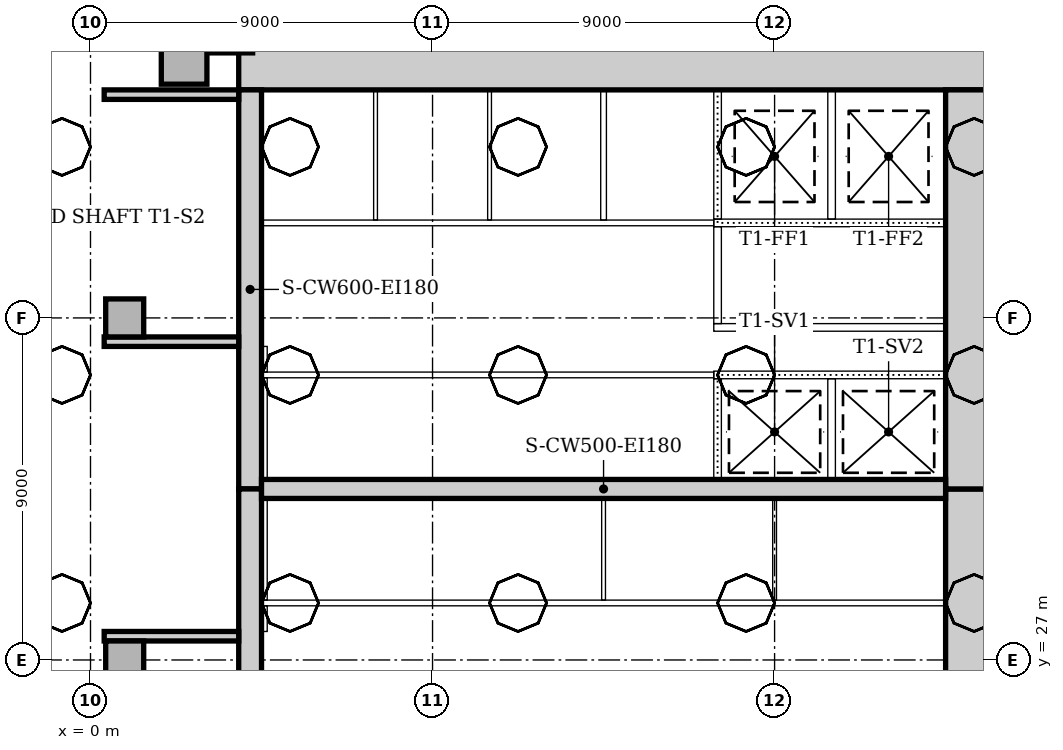
"""IFC4 building model, lengths in metres.
Left out: names, types, materials, properties, quantities, classifications, styles, units other than length and angle.
Written with IfcOpenShell. Run it as: python <this file> out.ifc"""

import sys

from ifc_helpers import new_model, si_unit, direction, frame, frame_2d, origin, origin_2d, place, context, subcontext, project, spatial, rectangle, extrude, element, fill, save


model = new_model("IFC4")
c1 = context("Model", 3, precision=1e-05, world=origin(), true_north=direction((0.0, 1.0)))
c2 = subcontext(c1, "Body", "Model", "MODEL_VIEW")
j1 = project(units=[si_unit("LENGTHUNIT", "METRE"), si_unit("PLANEANGLEUNIT", "RADIAN")], contexts=[c1])
p1 = place(None, origin())
s1 = spatial("IfcSite", under=j1, at=p1, CompositionType="ELEMENT")
p2 = place(p1, origin())
s2 = spatial("IfcBuilding", under=s1, at=p2, CompositionType="ELEMENT")
p3 = place(p2, frame((0.0, 0.0, -14.0)))
s3 = spatial("IfcBuildingStorey", under=s2, at=p3, CompositionType="ELEMENT", Elevation=-14.0)
p4 = place(p3, frame((23.7, 42.6, 0.0), z_axis=(0.0, 0.0, 1.0), x_axis=(-1.0, 0.0, 0.0)))
e1 = element("IfcWall", 1, at=p4, inside=s3, PredefinedType="SOLIDWALL", context=c2, shape_type="SweptSolid", body=[
    extrude(rectangle(XDim=19.8, YDim=1.2, at=frame_2d((9.9, 0.0))), origin(), (0.0, 0.0, 1.0), 4.5),
])
p5 = place(p3, frame((23.1, 21.0, 0.0), z_axis=(0.0, 0.0, 1.0), x_axis=(0.0, 1.0, 0.0)))
e2 = element("IfcWall", 2, at=p5, inside=s3, PredefinedType="SOLIDWALL", context=c2, shape_type="SweptSolid", body=[
    extrude(rectangle(XDim=10.5, YDim=1.2, at=frame_2d((5.25, 0.0))), origin(), (0.0, 0.0, 1.0), 4.5),
])
p6 = place(p5, frame((4.35, 0.0, 0.0)))
e3 = element("IfcOpeningElement", 3, at=p6, cuts=e2, PredefinedType="OPENING", context=c2, shape_type="SweptSolid", body=[
    extrude(rectangle(XDim=1.8, YDim=2.1, at=frame_2d((0.9, 1.05))), frame((0.0, 0.61, 0.0), z_axis=(0.0, -1.0, 0.0), x_axis=(1.0, 0.0, 0.0)), (0.0, 0.0, 1.0), 1.22),
])
p7 = place(p3, frame((23.1, 31.5, 0.0), z_axis=(0.0, 0.0, 1.0), x_axis=(0.0, 1.0, 0.0)))
e4 = element("IfcWall", 4, at=p7, inside=s3, PredefinedType="SOLIDWALL", context=c2, shape_type="SweptSolid", body=[
    extrude(rectangle(XDim=10.5, YDim=1.2, at=frame_2d((5.25, 0.0))), origin(), (0.0, 0.0, 1.0), 4.5),
])
p8 = place(p7, frame((3.15, 0.0, 0.0)))
e5 = element("IfcOpeningElement", 5, at=p8, cuts=e4, PredefinedType="OPENING", context=c2, shape_type="SweptSolid", body=[
    extrude(rectangle(XDim=1.0, YDim=2.1, at=frame_2d((0.5, 1.05))), frame((0.0, 0.61, 0.0), z_axis=(0.0, -1.0, 0.0), x_axis=(1.0, 0.0, 0.0)), (0.0, 0.0, 1.0), 1.22),
])
p9 = place(p7, frame((5.2, 0.0, 0.0)))
e6 = element("IfcOpeningElement", 6, at=p9, cuts=e4, PredefinedType="OPENING", context=c2, shape_type="SweptSolid", body=[
    extrude(rectangle(XDim=1.0, YDim=2.1, at=frame_2d((0.5, 1.05))), frame((0.0, 0.61, 0.0), z_axis=(0.0, -1.0, 0.0), x_axis=(1.0, 0.0, 0.0)), (0.0, 0.0, 1.0), 1.22),
])
for number, where, z_axis, x_axis in (
    (7, (4.2, 42.0, 0.0), (0.0, 0.0, 1.0), (0.0, -1.0, 0.0)),
    (8, (4.2, 31.5, 0.0), (0.0, 0.0, 1.0), (0.0, -1.0, 0.0)),
):
    element("IfcWall", number, at=place(p3, frame(where, z_axis=z_axis, x_axis=x_axis)), inside=s3, PredefinedType="SOLIDWALL", context=c2, shape_type="SweptSolid", body=[
        extrude(rectangle(XDim=10.5, YDim=0.6, at=frame_2d((5.25, 0.0))), origin(), (0.0, 0.0, 1.0), 4.5),
    ])
p10 = place(p3, frame((4.5, 31.5, 0.0), z_axis=(0.0, 0.0, 1.0), x_axis=(1.0, 0.0, 0.0)))
e9 = element("IfcWall", 9, at=p10, inside=s3, PredefinedType="SOLIDWALL", context=c2, shape_type="SweptSolid", body=[
    extrude(rectangle(XDim=18.0, YDim=0.5, at=frame_2d((9.0, 0.0))), origin(), (0.0, 0.0, 1.0), 4.5),
])
for number, where, z_axis, x_axis in (
    (10, (3.9, 27.625, 0.0), (0.0, 0.0, 1.0), (-1.0, 0.0, 0.0)),
    (11, (0.36, 35.375, 0.0), (0.0, 0.0, 1.0), (1.0, 0.0, 0.0)),
    (12, (3.9, 41.875, 0.0), (0.0, 0.0, 1.0), (-1.0, 0.0, 0.0)),
):
    element("IfcWall", number, at=place(p3, frame(where, z_axis=z_axis, x_axis=x_axis)), inside=s3, PredefinedType="SOLIDWALL", context=c2, shape_type="SweptSolid", body=[
        extrude(rectangle(XDim=3.54, YDim=0.25, at=frame_2d((1.77, 0.0))), origin(), (0.0, 0.0, 1.0), 4.5),
    ])
for number, where, z_axis, x_axis in (
    (13, (3.667, 43.574, 0.0), (0.0, 0.0, 1.0), (1.0, 0.0, 0.0)),
    (14, (2.463, 42.75, 0.0), (0.0, 0.0, 1.0), (1.0, 0.0, 0.0)),
):
    element("IfcColumn", number, at=place(p3, frame(where, z_axis=z_axis, x_axis=x_axis)), inside=s3, PredefinedType="COLUMN", context=c2, shape_type="SweptSolid", body=[
        extrude(rectangle(XDim=1.2, YDim=1.2, at=origin_2d()), origin(), (0.0, 0.0, 1.0), 4.15),
    ])
for number, where, z_axis, x_axis in (
    (15, (0.9, 27.0, 0.0), (0.0, 0.0, 1.0), (1.0, 0.0, 0.0)),
    (16, (0.9, 36.0, 0.0), (0.0, 0.0, 1.0), (1.0, 0.0, 0.0)),
):
    element("IfcColumn", number, at=place(p3, frame(where, z_axis=z_axis, x_axis=x_axis)), inside=s3, PredefinedType="COLUMN", context=c2, shape_type="SweptSolid", body=[
        extrude(rectangle(XDim=1.0, YDim=1.0, at=origin_2d()), origin(), (0.0, 0.0, 1.0), 4.5),
    ])
p11 = place(p3, frame((16.4, 35.75, 0.0), z_axis=(0.0, 0.0, 1.0), x_axis=(1.0, 0.0, 0.0)))
e17 = element("IfcWall", 17, at=p11, inside=s3, PredefinedType="PARTITIONING", context=c2, shape_type="SweptSolid", body=[
    extrude(rectangle(XDim=6.1, YDim=0.2, at=frame_2d((3.05, 0.0))), origin(), (0.0, 0.0, 1.0), 4.15),
])
p12 = place(p3, frame((16.4, 38.5, 0.0), z_axis=(0.0, 0.0, 1.0), x_axis=(1.0, 0.0, 0.0)))
e18 = element("IfcWall", 18, at=p12, inside=s3, PredefinedType="PARTITIONING", context=c2, shape_type="SweptSolid", body=[
    extrude(rectangle(XDim=6.1, YDim=0.2, at=frame_2d((3.05, 0.0))), origin(), (0.0, 0.0, 1.0), 4.15),
])
p13 = place(p12, frame((1.0, 0.0, 0.0)))
e19 = element("IfcOpeningElement", 19, at=p13, cuts=e18, PredefinedType="OPENING", context=c2, shape_type="SweptSolid", body=[
    extrude(rectangle(XDim=1.2, YDim=2.1, at=frame_2d((0.6, 1.05))), frame((0.0, 0.11, 0.0), z_axis=(0.0, -1.0, 0.0), x_axis=(1.0, 0.0, 0.0)), (0.0, 0.0, 1.0), 0.22),
])
p14 = place(p12, frame((4.0, 0.0, 0.0)))
e20 = element("IfcOpeningElement", 20, at=p14, cuts=e18, PredefinedType="OPENING", context=c2, shape_type="SweptSolid", body=[
    extrude(rectangle(XDim=1.2, YDim=2.1, at=frame_2d((0.6, 1.05))), frame((0.0, 0.11, 0.0), z_axis=(0.0, -1.0, 0.0), x_axis=(1.0, 0.0, 0.0)), (0.0, 0.0, 1.0), 0.22),
])
p15 = place(p3, frame((16.5, 35.85, 0.0), z_axis=(0.0, 0.0, 1.0), x_axis=(0.0, 1.0, 0.0)))
e21 = element("IfcWall", 21, at=p15, inside=s3, PredefinedType="PARTITIONING", context=c2, shape_type="SweptSolid", body=[
    extrude(rectangle(XDim=2.55, YDim=0.2, at=frame_2d((1.275, 0.0))), origin(), (0.0, 0.0, 1.0), 4.15),
])
p16 = place(p3, frame((16.4, 34.5, 0.0), z_axis=(0.0, 0.0, 1.0), x_axis=(1.0, 0.0, 0.0)))
e22 = element("IfcWall", 22, at=p16, inside=s3, PredefinedType="PARTITIONING", context=c2, shape_type="SweptSolid", body=[
    extrude(rectangle(XDim=6.1, YDim=0.2, at=frame_2d((3.05, 0.0))), origin(), (0.0, 0.0, 1.0), 4.15),
])
p17 = place(p16, frame((1.05, 0.0, 0.0)))
e23 = element("IfcOpeningElement", 23, at=p17, cuts=e22, PredefinedType="OPENING", context=c2, shape_type="SweptSolid", body=[
    extrude(rectangle(XDim=1.1, YDim=2.1, at=frame_2d((0.55, 1.05))), frame((0.0, 0.11, 0.0), z_axis=(0.0, -1.0, 0.0), x_axis=(1.0, 0.0, 0.0)), (0.0, 0.0, 1.0), 0.22),
])
p18 = place(p16, frame((4.05, 0.0, 0.0)))
e24 = element("IfcOpeningElement", 24, at=p18, cuts=e22, PredefinedType="OPENING", context=c2, shape_type="SweptSolid", body=[
    extrude(rectangle(XDim=1.1, YDim=2.1, at=frame_2d((0.55, 1.05))), frame((0.0, 0.11, 0.0), z_axis=(0.0, -1.0, 0.0), x_axis=(1.0, 0.0, 0.0)), (0.0, 0.0, 1.0), 0.22),
])
for number, where, z_axis, x_axis in (
    (25, (16.5, 38.6, 0.0), (0.0, 0.0, 1.0), (0.0, 1.0, 0.0)),
    (26, (19.5, 38.6, 0.0), (0.0, 0.0, 1.0), (0.0, 1.0, 0.0)),
):
    element("IfcWall", number, at=place(p3, frame(where, z_axis=z_axis, x_axis=x_axis)), inside=s3, PredefinedType="PARTITIONING", context=c2, shape_type="SweptSolid", body=[
        extrude(rectangle(XDim=3.4, YDim=0.2, at=frame_2d((1.7, 0.0))), origin(), (0.0, 0.0, 1.0), 4.15),
    ])
for number, where, z_axis, x_axis in (
    (27, (16.5, 31.75, 0.0), (0.0, 0.0, 1.0), (0.0, 1.0, 0.0)),
    (28, (19.5, 31.75, 0.0), (0.0, 0.0, 1.0), (0.0, 1.0, 0.0)),
):
    element("IfcWall", number, at=place(p3, frame(where, z_axis=z_axis, x_axis=x_axis)), inside=s3, PredefinedType="PARTITIONING", context=c2, shape_type="SweptSolid", body=[
        extrude(rectangle(XDim=2.65, YDim=0.2, at=frame_2d((1.325, 0.0))), origin(), (0.0, 0.0, 1.0), 4.15),
    ])
p19 = place(p3, frame((4.5, 28.5, 0.0), z_axis=(0.0, 0.0, 1.0), x_axis=(1.0, 0.0, 0.0)))
e29 = element("IfcWall", 29, at=p19, inside=s3, PredefinedType="PARTITIONING", context=c2, shape_type="SweptSolid", body=[
    extrude(rectangle(XDim=18.0, YDim=0.15, at=frame_2d((9.0, 0.0))), origin(), (0.0, 0.0, 1.0), 4.15),
])
p20 = place(p19, frame((4.1, 0.0, 0.0)))
e30 = element("IfcOpeningElement", 30, at=p20, cuts=e29, PredefinedType="OPENING", context=c2, shape_type="SweptSolid", body=[
    extrude(rectangle(XDim=0.9, YDim=2.1, at=frame_2d((0.45, 1.05))), frame((0.0, 0.085, 0.0), z_axis=(0.0, -1.0, 0.0), x_axis=(1.0, 0.0, 0.0)), (0.0, 0.0, 1.0), 0.17),
])
p21 = place(p19, frame((10.8, 0.0, 0.0)))
e31 = element("IfcOpeningElement", 31, at=p21, cuts=e29, PredefinedType="OPENING", context=c2, shape_type="SweptSolid", body=[
    extrude(rectangle(XDim=0.9, YDim=2.1, at=frame_2d((0.45, 1.05))), frame((0.0, 0.085, 0.0), z_axis=(0.0, -1.0, 0.0), x_axis=(1.0, 0.0, 0.0)), (0.0, 0.0, 1.0), 0.17),
])
p22 = place(p19, frame((15.2, 0.0, 0.0)))
e32 = element("IfcOpeningElement", 32, at=p22, cuts=e29, PredefinedType="OPENING", context=c2, shape_type="SweptSolid", body=[
    extrude(rectangle(XDim=0.9, YDim=2.1, at=frame_2d((0.45, 1.05))), frame((0.0, 0.085, 0.0), z_axis=(0.0, -1.0, 0.0), x_axis=(1.0, 0.0, 0.0)), (0.0, 0.0, 1.0), 0.17),
])
p23 = place(p3, frame((4.5, 34.5, 0.0), z_axis=(0.0, 0.0, 1.0), x_axis=(1.0, 0.0, 0.0)))
e33 = element("IfcWall", 33, at=p23, inside=s3, PredefinedType="PARTITIONING", context=c2, shape_type="SweptSolid", body=[
    extrude(rectangle(XDim=11.9, YDim=0.15, at=frame_2d((5.95, 0.0))), origin(), (0.0, 0.0, 1.0), 4.15),
])
p24 = place(p23, frame((5.5, 0.0, 0.0)))
e34 = element("IfcOpeningElement", 34, at=p24, cuts=e33, PredefinedType="OPENING", context=c2, shape_type="SweptSolid", body=[
    extrude(rectangle(XDim=0.9, YDim=2.1, at=frame_2d((0.45, 1.05))), frame((0.0, 0.085, 0.0), z_axis=(0.0, -1.0, 0.0), x_axis=(1.0, 0.0, 0.0)), (0.0, 0.0, 1.0), 0.17),
])
p25 = place(p3, frame((4.5, 38.5, 0.0), z_axis=(0.0, 0.0, 1.0), x_axis=(1.0, 0.0, 0.0)))
e35 = element("IfcWall", 35, at=p25, inside=s3, PredefinedType="PARTITIONING", context=c2, shape_type="SweptSolid", body=[
    extrude(rectangle(XDim=11.9, YDim=0.15, at=frame_2d((5.95, 0.0))), origin(), (0.0, 0.0, 1.0), 4.15),
])
p26 = place(p25, frame((1.1, 0.0, 0.0)))
e36 = element("IfcOpeningElement", 36, at=p26, cuts=e35, PredefinedType="OPENING", context=c2, shape_type="SweptSolid", body=[
    extrude(rectangle(XDim=0.9, YDim=2.1, at=frame_2d((0.45, 1.05))), frame((0.0, 0.085, 0.0), z_axis=(0.0, -1.0, 0.0), x_axis=(1.0, 0.0, 0.0)), (0.0, 0.0, 1.0), 0.17),
])
p27 = place(p25, frame((4.05, 0.0, 0.0)))
e37 = element("IfcOpeningElement", 37, at=p27, cuts=e35, PredefinedType="OPENING", context=c2, shape_type="SweptSolid", body=[
    extrude(rectangle(XDim=0.9, YDim=2.1, at=frame_2d((0.45, 1.05))), frame((0.0, 0.085, 0.0), z_axis=(0.0, -1.0, 0.0), x_axis=(1.0, 0.0, 0.0)), (0.0, 0.0, 1.0), 0.17),
])
p28 = place(p25, frame((7.05, 0.0, 0.0)))
e38 = element("IfcOpeningElement", 38, at=p28, cuts=e35, PredefinedType="OPENING", context=c2, shape_type="SweptSolid", body=[
    extrude(rectangle(XDim=0.9, YDim=2.1, at=frame_2d((0.45, 1.05))), frame((0.0, 0.085, 0.0), z_axis=(0.0, -1.0, 0.0), x_axis=(1.0, 0.0, 0.0)), (0.0, 0.0, 1.0), 0.17),
])
p29 = place(p25, frame((9.95, 0.0, 0.0)))
e39 = element("IfcOpeningElement", 39, at=p29, cuts=e35, PredefinedType="OPENING", context=c2, shape_type="SweptSolid", body=[
    extrude(rectangle(XDim=0.8, YDim=2.1, at=frame_2d((0.4, 1.05))), frame((0.0, 0.085, 0.0), z_axis=(0.0, -1.0, 0.0), x_axis=(1.0, 0.0, 0.0)), (0.0, 0.0, 1.0), 0.17),
])
p30 = place(p3, frame((4.575, 34.575, 0.0), z_axis=(0.0, 0.0, 1.0), x_axis=(0.0, 1.0, 0.0)))
e40 = element("IfcWall", 40, at=p30, inside=s3, PredefinedType="PARTITIONING", context=c2, shape_type="SweptSolid", body=[
    extrude(rectangle(XDim=0.675, YDim=0.15, at=frame_2d((0.338, 0.0))), origin(), (0.0, 0.0, 1.0), 4.15),
])
p31 = place(p3, frame((4.575, 31.75, 0.0), z_axis=(0.0, 0.0, 1.0), x_axis=(0.0, 1.0, 0.0)))
e41 = element("IfcWall", 41, at=p31, inside=s3, PredefinedType="PARTITIONING", context=c2, shape_type="SweptSolid", body=[
    extrude(rectangle(XDim=2.675, YDim=0.15, at=frame_2d((1.337, 0.0))), origin(), (0.0, 0.0, 1.0), 4.15),
])
p32 = place(p3, frame((4.575, 27.75, 0.0), z_axis=(0.0, 0.0, 1.0), x_axis=(0.0, 1.0, 0.0)))
e42 = element("IfcWall", 42, at=p32, inside=s3, PredefinedType="PARTITIONING", context=c2, shape_type="SweptSolid", body=[
    extrude(rectangle(XDim=0.675, YDim=0.15, at=frame_2d((0.338, 0.0))), origin(), (0.0, 0.0, 1.0), 4.15),
])
p33 = place(p3, frame((4.575, 28.575, 0.0), z_axis=(0.0, 0.0, 1.0), x_axis=(0.0, 1.0, 0.0)))
e43 = element("IfcWall", 43, at=p33, inside=s3, PredefinedType="PARTITIONING", context=c2, shape_type="SweptSolid", body=[
    extrude(rectangle(XDim=2.675, YDim=0.15, at=frame_2d((1.337, 0.0))), origin(), (0.0, 0.0, 1.0), 4.15),
])
p34 = place(p3, frame((13.5, 38.575, 0.0), z_axis=(0.0, 0.0, 1.0), x_axis=(0.0, 1.0, 0.0)))
e44 = element("IfcWall", 44, at=p34, inside=s3, PredefinedType="PARTITIONING", context=c2, shape_type="SweptSolid", body=[
    extrude(rectangle(XDim=3.425, YDim=0.15, at=frame_2d((1.712, 0.0))), origin(), (0.0, 0.0, 1.0), 4.15),
])
for number, where, z_axis, x_axis in (
    (45, (7.5, 38.575, 0.0), (0.0, 0.0, 1.0), (0.0, 1.0, 0.0)),
    (46, (10.5, 38.575, 0.0), (0.0, 0.0, 1.0), (0.0, 1.0, 0.0)),
):
    element("IfcWall", number, at=place(p3, frame(where, z_axis=z_axis, x_axis=x_axis)), inside=s3, PredefinedType="PARTITIONING", context=c2, shape_type="SweptSolid", body=[
        extrude(rectangle(XDim=3.425, YDim=0.1, at=frame_2d((1.712, 0.0))), origin(), (0.0, 0.0, 1.0), 4.15),
    ])
for number, where, z_axis, x_axis in (
    (47, (13.5, 28.575, 0.0), (0.0, 0.0, 1.0), (0.0, 1.0, 0.0)),
    (48, (18.0, 28.575, 0.0), (0.0, 0.0, 1.0), (0.0, 1.0, 0.0)),
):
    element("IfcWall", number, at=place(p3, frame(where, z_axis=z_axis, x_axis=x_axis)), inside=s3, PredefinedType="PARTITIONING", context=c2, shape_type="SweptSolid", body=[
        extrude(rectangle(XDim=2.675, YDim=0.1, at=frame_2d((1.337, 0.0))), origin(), (0.0, 0.0, 1.0), 4.15),
    ])
p35 = place(p2, frame((0.0, 0.0, -9.5)))
s4 = spatial("IfcBuildingStorey", under=s2, at=p35, CompositionType="ELEMENT", Elevation=-9.5)
p36 = place(p35, frame((0.48, 40.17, -4.5), z_axis=(0.0, 0.0, 1.0), x_axis=(0.0, 1.0, 0.0)))
e49 = element("IfcWall", 49, at=p36, inside=s4, PredefinedType="STANDARD", context=c2, shape_type="SweptSolid", body=[
    extrude(rectangle(XDim=1.58, YDim=0.24, at=frame_2d((0.79, 0.0))), origin(), (0.0, 0.0, 1.0), 9.0),
])
p37 = place(p17, origin())
e50 = element("IfcDoor", 50, at=p37, inside=s3, OperationType="SLIDING_TO_LEFT", PredefinedType="DOOR", context=c2, shape_type="SweptSolid", body=[
    extrude(rectangle(XDim=1.1, YDim=2.1, at=frame_2d((0.55, 1.05))), frame((0.0, 0.025, 0.0), z_axis=(0.0, -1.0, 0.0), x_axis=(1.0, 0.0, 0.0)), (0.0, 0.0, 1.0), 0.05),
])
fill(e23, e50)
p38 = place(p18, origin())
e51 = element("IfcDoor", 51, at=p38, inside=s3, OperationType="SLIDING_TO_LEFT", PredefinedType="DOOR", context=c2, shape_type="SweptSolid", body=[
    extrude(rectangle(XDim=1.1, YDim=2.1, at=frame_2d((0.55, 1.05))), frame((0.0, 0.025, 0.0), z_axis=(0.0, -1.0, 0.0), x_axis=(1.0, 0.0, 0.0)), (0.0, 0.0, 1.0), 0.05),
])
fill(e24, e51)
p39 = place(p13, origin())
e52 = element("IfcDoor", 52, at=p39, inside=s3, OperationType="SLIDING_TO_LEFT", PredefinedType="DOOR", context=c2, shape_type="SweptSolid", body=[
    extrude(rectangle(XDim=1.2, YDim=2.1, at=frame_2d((0.6, 1.05))), frame((0.0, 0.025, 0.0), z_axis=(0.0, -1.0, 0.0), x_axis=(1.0, 0.0, 0.0)), (0.0, 0.0, 1.0), 0.05),
])
fill(e19, e52)
p40 = place(p14, origin())
e53 = element("IfcDoor", 53, at=p40, inside=s3, OperationType="SLIDING_TO_LEFT", PredefinedType="DOOR", context=c2, shape_type="SweptSolid", body=[
    extrude(rectangle(XDim=1.2, YDim=2.1, at=frame_2d((0.6, 1.05))), frame((0.0, 0.025, 0.0), z_axis=(0.0, -1.0, 0.0), x_axis=(1.0, 0.0, 0.0)), (0.0, 0.0, 1.0), 0.05),
])
fill(e20, e53)
p41 = place(p6, frame((1.8, 0.0, 0.0), z_axis=(0.0, 0.0, 1.0), x_axis=(-1.0, 0.0, 0.0)))
e54 = element("IfcDoor", 54, at=p41, inside=s3, OperationType="DOUBLE_DOOR_DOUBLE_SWING", PredefinedType="DOOR", context=c2, shape_type="SweptSolid", body=[
    extrude(rectangle(XDim=1.8, YDim=2.1, at=frame_2d((0.9, 1.05))), frame((0.0, 0.025, 0.0), z_axis=(0.0, -1.0, 0.0), x_axis=(1.0, 0.0, 0.0)), (0.0, 0.0, 1.0), 0.05),
])
fill(e3, e54)
p42 = place(p8, frame((1.0, 0.0, 0.0), z_axis=(0.0, 0.0, 1.0), x_axis=(-1.0, 0.0, 0.0)))
e55 = element("IfcDoor", 55, at=p42, inside=s3, OperationType="SINGLE_SWING_RIGHT", PredefinedType="DOOR", context=c2, shape_type="SweptSolid", body=[
    extrude(rectangle(XDim=1.0, YDim=2.1, at=frame_2d((0.5, 1.05))), frame((0.0, 0.025, 0.0), z_axis=(0.0, -1.0, 0.0), x_axis=(1.0, 0.0, 0.0)), (0.0, 0.0, 1.0), 0.05),
])
fill(e5, e55)
p43 = place(p9, frame((1.0, 0.0, 0.0), z_axis=(0.0, 0.0, 1.0), x_axis=(-1.0, 0.0, 0.0)))
e56 = element("IfcDoor", 56, at=p43, inside=s3, OperationType="SINGLE_SWING_RIGHT", PredefinedType="DOOR", context=c2, shape_type="SweptSolid", body=[
    extrude(rectangle(XDim=1.0, YDim=2.1, at=frame_2d((0.5, 1.05))), frame((0.0, 0.025, 0.0), z_axis=(0.0, -1.0, 0.0), x_axis=(1.0, 0.0, 0.0)), (0.0, 0.0, 1.0), 0.05),
])
fill(e6, e56)
p44 = place(p20, origin())
e57 = element("IfcDoor", 57, at=p44, inside=s3, OperationType="SINGLE_SWING_RIGHT", PredefinedType="DOOR", context=c2, shape_type="SweptSolid", body=[
    extrude(rectangle(XDim=0.9, YDim=2.1, at=frame_2d((0.45, 1.05))), frame((0.0, 0.025, 0.0), z_axis=(0.0, -1.0, 0.0), x_axis=(1.0, 0.0, 0.0)), (0.0, 0.0, 1.0), 0.05),
])
fill(e30, e57)
p45 = place(p21, origin())
e58 = element("IfcDoor", 58, at=p45, inside=s3, OperationType="SINGLE_SWING_LEFT", PredefinedType="DOOR", context=c2, shape_type="SweptSolid", body=[
    extrude(rectangle(XDim=0.9, YDim=2.1, at=frame_2d((0.45, 1.05))), frame((0.0, 0.025, 0.0), z_axis=(0.0, -1.0, 0.0), x_axis=(1.0, 0.0, 0.0)), (0.0, 0.0, 1.0), 0.05),
])
fill(e31, e58)
p46 = place(p22, origin())
e59 = element("IfcDoor", 59, at=p46, inside=s3, OperationType="SINGLE_SWING_RIGHT", PredefinedType="DOOR", context=c2, shape_type="SweptSolid", body=[
    extrude(rectangle(XDim=0.9, YDim=2.1, at=frame_2d((0.45, 1.05))), frame((0.0, 0.025, 0.0), z_axis=(0.0, -1.0, 0.0), x_axis=(1.0, 0.0, 0.0)), (0.0, 0.0, 1.0), 0.05),
])
fill(e32, e59)
p47 = place(p24, frame((0.9, 0.0, 0.0), z_axis=(0.0, 0.0, 1.0), x_axis=(-1.0, 0.0, 0.0)))
e60 = element("IfcDoor", 60, at=p47, inside=s3, OperationType="SINGLE_SWING_RIGHT", PredefinedType="DOOR", context=c2, shape_type="SweptSolid", body=[
    extrude(rectangle(XDim=0.9, YDim=2.1, at=frame_2d((0.45, 1.05))), frame((0.0, 0.025, 0.0), z_axis=(0.0, -1.0, 0.0), x_axis=(1.0, 0.0, 0.0)), (0.0, 0.0, 1.0), 0.05),
])
fill(e34, e60)
p48 = place(p26, origin())
e61 = element("IfcDoor", 61, at=p48, inside=s3, OperationType="SINGLE_SWING_LEFT", PredefinedType="DOOR", context=c2, shape_type="SweptSolid", body=[
    extrude(rectangle(XDim=0.9, YDim=2.1, at=frame_2d((0.45, 1.05))), frame((0.0, 0.025, 0.0), z_axis=(0.0, -1.0, 0.0), x_axis=(1.0, 0.0, 0.0)), (0.0, 0.0, 1.0), 0.05),
])
fill(e36, e61)
p49 = place(p27, origin())
e62 = element("IfcDoor", 62, at=p49, inside=s3, OperationType="SINGLE_SWING_LEFT", PredefinedType="DOOR", context=c2, shape_type="SweptSolid", body=[
    extrude(rectangle(XDim=0.9, YDim=2.1, at=frame_2d((0.45, 1.05))), frame((0.0, 0.025, 0.0), z_axis=(0.0, -1.0, 0.0), x_axis=(1.0, 0.0, 0.0)), (0.0, 0.0, 1.0), 0.05),
])
fill(e37, e62)
p50 = place(p28, origin())
e63 = element("IfcDoor", 63, at=p50, inside=s3, OperationType="SINGLE_SWING_LEFT", PredefinedType="DOOR", context=c2, shape_type="SweptSolid", body=[
    extrude(rectangle(XDim=0.9, YDim=2.1, at=frame_2d((0.45, 1.05))), frame((0.0, 0.025, 0.0), z_axis=(0.0, -1.0, 0.0), x_axis=(1.0, 0.0, 0.0)), (0.0, 0.0, 1.0), 0.05),
])
fill(e38, e63)
p51 = place(p29, origin())
e64 = element("IfcDoor", 64, at=p51, inside=s3, OperationType="SINGLE_SWING_RIGHT", PredefinedType="DOOR", context=c2, shape_type="SweptSolid", body=[
    extrude(rectangle(XDim=0.8, YDim=2.1, at=frame_2d((0.4, 1.05))), frame((0.0, 0.025, 0.0), z_axis=(0.0, -1.0, 0.0), x_axis=(1.0, 0.0, 0.0)), (0.0, 0.0, 1.0), 0.05),
])
fill(e39, e64)
save(model, sys.argv[1])
